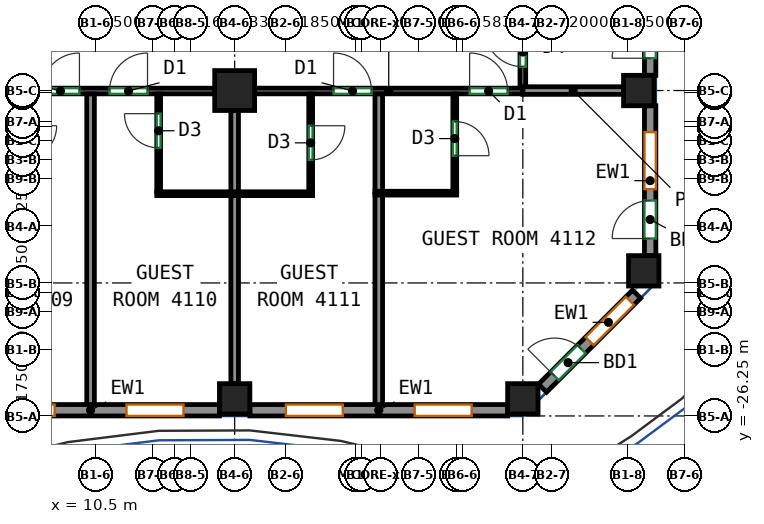
"""IFC4 building model, lengths in metres.
Left out: names, types, materials, properties, quantities, classifications, styles, units other than length and angle.
Written with IfcOpenShell. Run it as: python <this file> out.ifc"""

import sys

from ifc_helpers import new_model, si_unit, direction, frame, frame_2d, origin, origin_2d, place, context, subcontext, project, spatial, rectangle, extrude, source, transform, mapped, element, fill, save


model = new_model("IFC4")
c1 = context("Model", 3, precision=1e-05, world=origin(), true_north=direction((0.0, 1.0)))
c2 = subcontext(c1, "Body", "Model", "MODEL_VIEW")
j1 = project(units=[si_unit("LENGTHUNIT", "METRE"), si_unit("PLANEANGLEUNIT", "RADIAN")], contexts=[c1])
p1 = place(None, origin())
s1 = spatial("IfcSite", under=j1, at=p1, CompositionType="ELEMENT")
p2 = place(p1, origin())
s2 = spatial("IfcBuilding", under=s1, at=p2, CompositionType="ELEMENT")
p3 = place(p2, frame((0.0, 0.0, 175.3)))
s3 = spatial("IfcBuildingStorey", under=s2, at=p3, CompositionType="ELEMENT", Elevation=175.3)
m1 = source(origin(), c2, "Body", "SweptSolid", [
    extrude(rectangle(XDim=0.8, YDim=0.8, at=origin_2d()), origin(), (0.0, 0.0, 1.0), 3.12),
])
p4 = place(p3, frame((14.167, -25.8, 0.0), z_axis=(0.0, 0.0, 1.0), x_axis=(1.0, 0.0, 0.0)))
e1 = element("IfcColumn", 1, at=p4, inside=s3, PredefinedType="COLUMN", context=c2, shape_type="MappedRepresentation", body=[
    mapped(m1, transform((0.0, 0.0, 0.0))),
])
m2 = source(origin(), c2, "Body", "SweptSolid", [
    extrude(rectangle(XDim=1.05, YDim=1.05, at=origin_2d()), origin(), (0.0, 0.0, 1.0), 3.12),
])
p5 = place(p3, frame((14.167, -17.688, 0.0), z_axis=(0.0, 0.0, 1.0), x_axis=(1.0, 0.0, 0.0)))
e2 = element("IfcColumn", 2, at=p5, inside=s3, PredefinedType="COLUMN", context=c2, shape_type="MappedRepresentation", body=[
    mapped(m2, transform((0.0, 0.0, 0.0))),
])
for number, where, z_axis, x_axis in (
    (3, (21.75, -25.8, 0.0), (0.0, 0.0, 1.0), (1.0, 0.0, 0.0)),
    (4, (24.8, -17.688, 0.0), (0.0, 0.0, 1.0), (1.0, 0.0, 0.0)),
    (5, (24.932, -22.432, 0.0), (0.0, 0.0, 1.0), (1.0, 0.0, 0.0)),
):
    element("IfcColumn", number, at=place(p3, frame(where, z_axis=z_axis, x_axis=x_axis)), inside=s3, PredefinedType="COLUMN", context=c2, shape_type="MappedRepresentation", body=[
        mapped(m1, transform((0.0, 0.0, 0.0))),
    ])
m3 = source(origin(), c2, "Body", "SweptSolid", [
    extrude(rectangle(XDim=6.783, YDim=0.3, at=frame_2d((3.392, 0.0))), origin(), (0.0, 0.0, 1.0), 3.12),
])
p6 = place(p3, frame((6.983, -26.1, 0.0), z_axis=(0.0, 0.0, 1.0), x_axis=(1.0, 0.0, 0.0)))
e6 = element("IfcWall", 6, at=p6, inside=s3, PredefinedType="SOLIDWALL", context=c2, shape_type="MappedRepresentation", body=[
    mapped(m3, transform((0.0, 0.0, 0.0))),
])
p7 = place(p6, frame((0.946, 0.0, 0.85)))
e7 = element("IfcOpeningElement", 7, at=p7, cuts=e6, PredefinedType="OPENING", context=c2, shape_type="SweptSolid", body=[
    extrude(rectangle(XDim=1.5, YDim=1.95, at=frame_2d((0.75, 0.975))), frame((0.0, 0.16, 0.0), z_axis=(0.0, -1.0, 0.0), x_axis=(1.0, 0.0, 0.0)), (0.0, 0.0, 1.0), 0.32),
])
p8 = place(p6, frame((4.338, 0.0, 0.85)))
e8 = element("IfcOpeningElement", 8, at=p8, cuts=e6, PredefinedType="OPENING", context=c2, shape_type="SweptSolid", body=[
    extrude(rectangle(XDim=1.5, YDim=1.95, at=frame_2d((0.75, 0.975))), frame((0.0, 0.16, 0.0), z_axis=(0.0, -1.0, 0.0), x_axis=(1.0, 0.0, 0.0)), (0.0, 0.0, 1.0), 0.32),
])
m4 = source(origin(), c2, "Body", "SweptSolid", [
    extrude(rectangle(XDim=6.783, YDim=0.3, at=frame_2d((3.392, 0.0))), origin(), (0.0, 0.0, 1.0), 3.12),
])
p9 = place(p3, frame((14.567, -26.1, 0.0), z_axis=(0.0, 0.0, 1.0), x_axis=(1.0, 0.0, 0.0)))
e9 = element("IfcWall", 9, at=p9, inside=s3, PredefinedType="SOLIDWALL", context=c2, shape_type="MappedRepresentation", body=[
    mapped(m4, transform((0.0, 0.0, 0.0))),
])
p10 = place(p9, frame((0.946, 0.0, 0.85)))
e10 = element("IfcOpeningElement", 10, at=p10, cuts=e9, PredefinedType="OPENING", context=c2, shape_type="SweptSolid", body=[
    extrude(rectangle(XDim=1.5, YDim=1.95, at=frame_2d((0.75, 0.975))), frame((0.0, 0.16, 0.0), z_axis=(0.0, -1.0, 0.0), x_axis=(1.0, 0.0, 0.0)), (0.0, 0.0, 1.0), 0.32),
])
p11 = place(p9, frame((4.337, 0.0, 0.85)))
e11 = element("IfcOpeningElement", 11, at=p11, cuts=e9, PredefinedType="OPENING", context=c2, shape_type="SweptSolid", body=[
    extrude(rectangle(XDim=1.5, YDim=1.95, at=frame_2d((0.75, 0.975))), frame((0.0, 0.16, 0.0), z_axis=(0.0, -1.0, 0.0), x_axis=(1.0, 0.0, 0.0)), (0.0, 0.0, 1.0), 0.32),
])
m5 = source(origin(), c2, "Body", "SweptSolid", [
    extrude(rectangle(XDim=3.5, YDim=0.3, at=frame_2d((1.75, 0.0))), origin(), (0.0, 0.0, 1.0), 3.12),
])
p12 = place(p3, frame((22.269, -25.519, 0.0), z_axis=(0.0, 0.0, 1.0), x_axis=(0.707141656123, 0.70707190453, 0.0)))
e12 = element("IfcWall", 12, at=p12, inside=s3, PredefinedType="SOLIDWALL", context=c2, shape_type="MappedRepresentation", body=[
    mapped(m5, transform((0.0, 0.0, 0.0))),
])
p13 = place(p12, frame((1.75, 0.0, 0.85)))
e13 = element("IfcOpeningElement", 13, at=p13, cuts=e12, PredefinedType="OPENING", context=c2, shape_type="SweptSolid", body=[
    extrude(rectangle(XDim=1.5, YDim=1.95, at=frame_2d((0.75, 0.975))), frame((0.0, 0.16, 0.0), z_axis=(0.0, -1.0, 0.0), x_axis=(1.0, 0.0, 0.0)), (0.0, 0.0, 1.0), 0.32),
])
p14 = place(p12, frame((0.45, 0.0, 0.0)))
e14 = element("IfcOpeningElement", 14, at=p14, cuts=e12, PredefinedType="OPENING", context=c2, shape_type="SweptSolid", body=[
    extrude(rectangle(XDim=1.0, YDim=2.1, at=frame_2d((0.5, 1.05))), frame((0.0, 0.16, 0.0), z_axis=(0.0, -1.0, 0.0), x_axis=(1.0, 0.0, 0.0)), (0.0, 0.0, 1.0), 0.32),
])
m6 = source(origin(), c2, "Body", "SweptSolid", [
    extrude(rectangle(XDim=3.944, YDim=0.3, at=frame_2d((1.972, 0.0))), origin(), (0.0, 0.0, 1.0), 3.12),
])
p15 = place(p3, frame((25.1, -22.032, 0.0), z_axis=(0.0, 0.0, 1.0), x_axis=(0.0, 1.0, 0.0)))
e15 = element("IfcWall", 15, at=p15, inside=s3, PredefinedType="SOLIDWALL", context=c2, shape_type="MappedRepresentation", body=[
    mapped(m6, transform((0.0, 0.0, 0.0))),
])
p16 = place(p15, frame((1.75, 0.0, 0.85)))
e16 = element("IfcOpeningElement", 16, at=p16, cuts=e15, PredefinedType="OPENING", context=c2, shape_type="SweptSolid", body=[
    extrude(rectangle(XDim=1.5, YDim=1.95, at=frame_2d((0.75, 0.975))), frame((0.0, 0.16, 0.0), z_axis=(0.0, -1.0, 0.0), x_axis=(1.0, 0.0, 0.0)), (0.0, 0.0, 1.0), 0.32),
])
p17 = place(p15, frame((0.45, 0.0, 0.0)))
e17 = element("IfcOpeningElement", 17, at=p17, cuts=e15, PredefinedType="OPENING", context=c2, shape_type="SweptSolid", body=[
    extrude(rectangle(XDim=1.0, YDim=2.1, at=frame_2d((0.5, 1.05))), frame((0.0, 0.16, 0.0), z_axis=(0.0, -1.0, 0.0), x_axis=(1.0, 0.0, 0.0)), (0.0, 0.0, 1.0), 0.32),
])
m7 = source(origin(), c2, "Body", "SweptSolid", [
    extrude(rectangle(XDim=7.763, YDim=0.3, at=frame_2d((3.881, 0.0))), origin(), (0.0, 0.0, 1.0), 3.12),
])
p18 = place(p3, frame((25.1, -17.288, 0.0), z_axis=(0.0, 0.0, 1.0), x_axis=(0.0, 1.0, 0.0)))
e18 = element("IfcWall", 18, at=p18, inside=s3, PredefinedType="SOLIDWALL", context=c2, shape_type="MappedRepresentation", body=[
    mapped(m7, transform((0.0, 0.0, 0.0))),
])
p19 = place(p18, frame((1.75, 0.0, 0.85)))
e19 = element("IfcOpeningElement", 19, at=p19, cuts=e18, PredefinedType="OPENING", context=c2, shape_type="SweptSolid", body=[
    extrude(rectangle(XDim=1.5, YDim=1.95, at=frame_2d((0.75, 0.975))), frame((0.0, 0.16, 0.0), z_axis=(0.0, -1.0, 0.0), x_axis=(1.0, 0.0, 0.0)), (0.0, 0.0, 1.0), 0.32),
])
p20 = place(p18, frame((0.45, 0.0, 0.0)))
e20 = element("IfcOpeningElement", 20, at=p20, cuts=e18, PredefinedType="OPENING", context=c2, shape_type="SweptSolid", body=[
    extrude(rectangle(XDim=1.0, YDim=2.1, at=frame_2d((0.5, 1.05))), frame((0.0, 0.16, 0.0), z_axis=(0.0, -1.0, 0.0), x_axis=(1.0, 0.0, 0.0)), (0.0, 0.0, 1.0), 0.32),
])
p21 = place(p18, frame((5.631, 0.0, 0.85)))
e21 = element("IfcOpeningElement", 21, at=p21, cuts=e18, PredefinedType="OPENING", context=c2, shape_type="SweptSolid", body=[
    extrude(rectangle(XDim=1.5, YDim=1.95, at=frame_2d((0.75, 0.975))), frame((0.0, 0.16, 0.0), z_axis=(0.0, -1.0, 0.0), x_axis=(1.0, 0.0, 0.0)), (0.0, 0.0, 1.0), 0.32),
])
p22 = place(p3, frame((7.108, -17.7, 0.0), z_axis=(0.0, 0.0, 1.0), x_axis=(1.0, 0.0, 0.0)))
e22 = element("IfcWall", 22, at=p22, inside=s3, PredefinedType="PARTITIONING", context=c2, shape_type="SweptSolid", body=[
    extrude(rectangle(XDim=6.534, YDim=0.15, at=frame_2d((3.267, 0.0))), origin(), (0.0, 0.0, 1.0), 3.12),
])
p23 = place(p22, frame((1.974, 0.0, 0.0)))
e23 = element("IfcOpeningElement", 23, at=p23, cuts=e22, PredefinedType="OPENING", context=c2, shape_type="SweptSolid", body=[
    extrude(rectangle(XDim=1.0, YDim=2.1, at=frame_2d((0.5, 1.05))), frame((0.0, 0.085, 0.0), z_axis=(0.0, -1.0, 0.0), x_axis=(1.0, 0.0, 0.0)), (0.0, 0.0, 1.0), 0.17),
])
p24 = place(p22, frame((3.766, 0.0, 0.0)))
e24 = element("IfcOpeningElement", 24, at=p24, cuts=e22, PredefinedType="OPENING", context=c2, shape_type="SweptSolid", body=[
    extrude(rectangle(XDim=1.0, YDim=2.1, at=frame_2d((0.5, 1.05))), frame((0.0, 0.085, 0.0), z_axis=(0.0, -1.0, 0.0), x_axis=(1.0, 0.0, 0.0)), (0.0, 0.0, 1.0), 0.17),
])
p25 = place(p3, frame((14.692, -17.7, 0.0), z_axis=(0.0, 0.0, 1.0), x_axis=(1.0, 0.0, 0.0)))
e25 = element("IfcWall", 25, at=p25, inside=s3, PredefinedType="PARTITIONING", context=c2, shape_type="SweptSolid", body=[
    extrude(rectangle(XDim=7.058, YDim=0.15, at=frame_2d((3.529, 0.0))), origin(), (0.0, 0.0, 1.0), 2.52),
])
p26 = place(p25, frame((2.077, 0.0, 0.0)))
e26 = element("IfcOpeningElement", 26, at=p26, cuts=e25, PredefinedType="OPENING", context=c2, shape_type="SweptSolid", body=[
    extrude(rectangle(XDim=1.0, YDim=2.1, at=frame_2d((0.5, 1.05))), frame((0.0, 0.085, 0.0), z_axis=(0.0, -1.0, 0.0), x_axis=(1.0, 0.0, 0.0)), (0.0, 0.0, 1.0), 0.17),
])
p27 = place(p25, frame((5.657, 0.0, 0.0)))
e27 = element("IfcOpeningElement", 27, at=p27, cuts=e25, PredefinedType="OPENING", context=c2, shape_type="SweptSolid", body=[
    extrude(rectangle(XDim=1.0, YDim=2.1, at=frame_2d((0.5, 1.05))), frame((0.0, 0.085, 0.0), z_axis=(0.0, -1.0, 0.0), x_axis=(1.0, 0.0, 0.0)), (0.0, 0.0, 1.0), 0.17),
])
p28 = place(p3, frame((21.75, -17.598, 0.0), z_axis=(0.0, 0.0, 1.0), x_axis=(0.0, 1.0, 0.0)))
e28 = element("IfcWall", 28, at=p28, inside=s3, PredefinedType="PARTITIONING", context=c2, shape_type="SweptSolid", body=[
    extrude(rectangle(XDim=1.848, YDim=0.15, at=frame_2d((0.924, 0.0))), origin(), (0.0, 0.0, 1.0), 3.12),
])
p29 = place(p28, frame((0.536, 0.0, 0.0)))
e29 = element("IfcOpeningElement", 29, at=p29, cuts=e28, PredefinedType="OPENING", context=c2, shape_type="SweptSolid", body=[
    extrude(rectangle(XDim=1.0, YDim=2.1, at=frame_2d((0.5, 1.05))), frame((0.0, 0.085, 0.0), z_axis=(0.0, -1.0, 0.0), x_axis=(1.0, 0.0, 0.0)), (0.0, 0.0, 1.0), 0.17),
])
p30 = place(p3, frame((10.375, -26.0, 0.0), z_axis=(0.0, 0.0, 1.0), x_axis=(0.0, 1.0, 0.0)))
e30 = element("IfcWall", 30, at=p30, inside=s3, PredefinedType="PARTITIONING", context=c2, shape_type="SweptSolid", body=[
    extrude(rectangle(XDim=8.223, YDim=0.2, at=frame_2d((4.111, 0.0))), origin(), (0.0, 0.0, 1.0), 3.12),
])
p31 = place(p3, frame((12.167, -20.352, 0.0), z_axis=(0.0, 0.0, 1.0), x_axis=(0.0, 1.0, 0.0)))
e31 = element("IfcWall", 31, at=p31, inside=s3, PredefinedType="PARTITIONING", context=c2, shape_type="SweptSolid", body=[
    extrude(rectangle(XDim=2.575, YDim=0.1, at=frame_2d((1.288, 0.0))), origin(), (0.0, 0.0, 1.0), 3.12),
])
p32 = place(p31, frame((1.156, 0.0, 0.0)))
e32 = element("IfcOpeningElement", 32, at=p32, cuts=e31, PredefinedType="OPENING", context=c2, shape_type="SweptSolid", body=[
    extrude(rectangle(XDim=0.9, YDim=2.1, at=frame_2d((0.45, 1.05))), frame((0.0, 0.06, 0.0), z_axis=(0.0, -1.0, 0.0), x_axis=(1.0, 0.0, 0.0)), (0.0, 0.0, 1.0), 0.12),
])
p33 = place(p3, frame((12.117, -20.402, 0.0), z_axis=(0.0, 0.0, 1.0), x_axis=(1.0, 0.0, 0.0)))
e33 = element("IfcWall", 33, at=p33, inside=s3, PredefinedType="PARTITIONING", context=c2, shape_type="SweptSolid", body=[
    extrude(rectangle(XDim=4.1, YDim=0.1, at=frame_2d((2.05, 0.0))), origin(), (0.0, 0.0, 1.0), 3.12),
])
p34 = place(p3, frame((14.167, -25.4, 0.0), z_axis=(0.0, 0.0, 1.0), x_axis=(0.0, 1.0, 0.0)))
e34 = element("IfcWall", 34, at=p34, inside=s3, PredefinedType="PARTITIONING", context=c2, shape_type="SweptSolid", body=[
    extrude(rectangle(XDim=4.948, YDim=0.2, at=frame_2d((2.474, 0.0))), origin(), (0.0, 0.0, 1.0), 3.12),
])
p35 = place(p3, frame((14.167, -20.352, 0.0), z_axis=(0.0, 0.0, 1.0), x_axis=(0.0, 1.0, 0.0)))
e35 = element("IfcWall", 35, at=p35, inside=s3, PredefinedType="PARTITIONING", context=c2, shape_type="SweptSolid", body=[
    extrude(rectangle(XDim=2.14, YDim=0.2, at=frame_2d((1.07, 0.0))), origin(), (0.0, 0.0, 1.0), 3.12),
])
p36 = place(p3, frame((16.167, -17.777, 0.0), z_axis=(0.0, 0.0, 1.0), x_axis=(0.0, -1.0, 0.0)))
e36 = element("IfcWall", 36, at=p36, inside=s3, PredefinedType="PARTITIONING", context=c2, shape_type="SweptSolid", body=[
    extrude(rectangle(XDim=2.575, YDim=0.1, at=frame_2d((1.288, 0.0))), origin(), (0.0, 0.0, 1.0), 3.12),
])
p37 = place(p36, frame((0.837, 0.0, 0.0)))
e37 = element("IfcOpeningElement", 37, at=p37, cuts=e36, PredefinedType="OPENING", context=c2, shape_type="SweptSolid", body=[
    extrude(rectangle(XDim=0.9, YDim=2.1, at=frame_2d((0.45, 1.05))), frame((0.0, 0.06, 0.0), z_axis=(0.0, -1.0, 0.0), x_axis=(1.0, 0.0, 0.0)), (0.0, 0.0, 1.0), 0.12),
])
p38 = place(p3, frame((17.959, -26.0, 0.0), z_axis=(0.0, 0.0, 1.0), x_axis=(0.0, 1.0, 0.0)))
e38 = element("IfcWall", 38, at=p38, inside=s3, PredefinedType="PARTITIONING", context=c2, shape_type="SweptSolid", body=[
    extrude(rectangle(XDim=5.572, YDim=0.2, at=frame_2d((2.786, 0.0))), origin(), (0.0, 0.0, 1.0), 3.12),
])
p39 = place(p3, frame((17.959, -20.348, 0.0), z_axis=(0.0, 0.0, 1.0), x_axis=(0.0, 1.0, 0.0)))
e39 = element("IfcWall", 39, at=p39, inside=s3, PredefinedType="PARTITIONING", context=c2, shape_type="SweptSolid", body=[
    extrude(rectangle(XDim=2.571, YDim=0.2, at=frame_2d((1.285, 0.0))), origin(), (0.0, 0.0, 1.0), 3.12),
])
p40 = place(p3, frame((17.859, -20.388, 0.0), z_axis=(0.0, 0.0, 1.0), x_axis=(1.0, 0.0, 0.0)))
e40 = element("IfcWall", 40, at=p40, inside=s3, PredefinedType="PARTITIONING", context=c2, shape_type="SweptSolid", body=[
    extrude(rectangle(XDim=2.15, YDim=0.1, at=frame_2d((1.075, 0.0))), origin(), (0.0, 0.0, 1.0), 3.12),
])
p41 = place(p3, frame((19.959, -17.777, 0.0), z_axis=(0.0, 0.0, 1.0), x_axis=(0.0, -1.0, 0.0)))
e41 = element("IfcWall", 41, at=p41, inside=s3, PredefinedType="PARTITIONING", context=c2, shape_type="SweptSolid", body=[
    extrude(rectangle(XDim=2.561, YDim=0.1, at=frame_2d((1.28, 0.0))), origin(), (0.0, 0.0, 1.0), 3.12),
])
p42 = place(p41, frame((0.725, 0.0, 0.0)))
e42 = element("IfcOpeningElement", 42, at=p42, cuts=e41, PredefinedType="OPENING", context=c2, shape_type="SweptSolid", body=[
    extrude(rectangle(XDim=0.9, YDim=2.1, at=frame_2d((0.45, 1.05))), frame((0.0, 0.06, 0.0), z_axis=(0.0, -1.0, 0.0), x_axis=(1.0, 0.0, 0.0)), (0.0, 0.0, 1.0), 0.12),
])
p43 = place(p3, frame((21.752, -17.688, 0.0), z_axis=(0.0, 0.0, 1.0), x_axis=(1.0, 0.0, 0.0)))
e43 = element("IfcWall", 43, at=p43, inside=s3, PredefinedType="PARTITIONING", context=c2, shape_type="SweptSolid", body=[
    extrude(rectangle(XDim=2.648, YDim=0.2, at=frame_2d((1.324, 0.0))), origin(), (0.0, 0.0, 1.0), 2.52),
])
p44 = place(p7, origin())
e44 = element("IfcWindow", 44, at=p44, inside=s3, PartitioningType="SINGLE_PANEL", PredefinedType="WINDOW", context=c2, shape_type="SweptSolid", body=[
    extrude(rectangle(XDim=1.5, YDim=1.95, at=frame_2d((0.75, 0.975))), frame((0.0, 0.03, 0.0), z_axis=(0.0, -1.0, 0.0), x_axis=(1.0, 0.0, 0.0)), (0.0, 0.0, 1.0), 0.06),
])
fill(e7, e44)
p45 = place(p8, origin())
e45 = element("IfcWindow", 45, at=p45, inside=s3, PartitioningType="SINGLE_PANEL", PredefinedType="WINDOW", context=c2, shape_type="SweptSolid", body=[
    extrude(rectangle(XDim=1.5, YDim=1.95, at=frame_2d((0.75, 0.975))), frame((0.0, 0.03, 0.0), z_axis=(0.0, -1.0, 0.0), x_axis=(1.0, 0.0, 0.0)), (0.0, 0.0, 1.0), 0.06),
])
fill(e8, e45)
p46 = place(p10, origin())
e46 = element("IfcWindow", 46, at=p46, inside=s3, PartitioningType="SINGLE_PANEL", PredefinedType="WINDOW", context=c2, shape_type="SweptSolid", body=[
    extrude(rectangle(XDim=1.5, YDim=1.95, at=frame_2d((0.75, 0.975))), frame((0.0, 0.03, 0.0), z_axis=(0.0, -1.0, 0.0), x_axis=(1.0, 0.0, 0.0)), (0.0, 0.0, 1.0), 0.06),
])
fill(e10, e46)
p47 = place(p11, origin())
e47 = element("IfcWindow", 47, at=p47, inside=s3, PartitioningType="SINGLE_PANEL", PredefinedType="WINDOW", context=c2, shape_type="SweptSolid", body=[
    extrude(rectangle(XDim=1.5, YDim=1.95, at=frame_2d((0.75, 0.975))), frame((0.0, 0.03, 0.0), z_axis=(0.0, -1.0, 0.0), x_axis=(1.0, 0.0, 0.0)), (0.0, 0.0, 1.0), 0.06),
])
fill(e11, e47)
p48 = place(p13, origin())
e48 = element("IfcWindow", 48, at=p48, inside=s3, PartitioningType="SINGLE_PANEL", PredefinedType="WINDOW", context=c2, shape_type="SweptSolid", body=[
    extrude(rectangle(XDim=1.5, YDim=1.95, at=frame_2d((0.75, 0.975))), frame((0.0, 0.03, 0.0), z_axis=(0.0, -1.0, 0.0), x_axis=(1.0, 0.0, 0.0)), (0.0, 0.0, 1.0), 0.06),
])
fill(e13, e48)
p49 = place(p14, origin())
e49 = element("IfcDoor", 49, at=p49, inside=s3, OperationType="SINGLE_SWING_LEFT", PredefinedType="DOOR", context=c2, shape_type="SweptSolid", body=[
    extrude(rectangle(XDim=1.0, YDim=2.1, at=frame_2d((0.5, 1.05))), frame((0.0, 0.025, 0.0), z_axis=(0.0, -1.0, 0.0), x_axis=(1.0, 0.0, 0.0)), (0.0, 0.0, 1.0), 0.05),
])
fill(e14, e49)
p50 = place(p16, origin())
e50 = element("IfcWindow", 50, at=p50, inside=s3, PartitioningType="SINGLE_PANEL", PredefinedType="WINDOW", context=c2, shape_type="SweptSolid", body=[
    extrude(rectangle(XDim=1.5, YDim=1.95, at=frame_2d((0.75, 0.975))), frame((0.0, 0.03, 0.0), z_axis=(0.0, -1.0, 0.0), x_axis=(1.0, 0.0, 0.0)), (0.0, 0.0, 1.0), 0.06),
])
fill(e16, e50)
p51 = place(p17, origin())
e51 = element("IfcDoor", 51, at=p51, inside=s3, OperationType="SINGLE_SWING_LEFT", PredefinedType="DOOR", context=c2, shape_type="SweptSolid", body=[
    extrude(rectangle(XDim=1.0, YDim=2.1, at=frame_2d((0.5, 1.05))), frame((0.0, 0.025, 0.0), z_axis=(0.0, -1.0, 0.0), x_axis=(1.0, 0.0, 0.0)), (0.0, 0.0, 1.0), 0.05),
])
fill(e17, e51)
p52 = place(p20, origin())
e52 = element("IfcDoor", 52, at=p52, inside=s3, OperationType="SINGLE_SWING_LEFT", PredefinedType="DOOR", context=c2, shape_type="SweptSolid", body=[
    extrude(rectangle(XDim=1.0, YDim=2.1, at=frame_2d((0.5, 1.05))), frame((0.0, 0.025, 0.0), z_axis=(0.0, -1.0, 0.0), x_axis=(1.0, 0.0, 0.0)), (0.0, 0.0, 1.0), 0.05),
])
fill(e20, e52)
p53 = place(p37, origin())
e53 = element("IfcDoor", 53, at=p53, inside=s3, OperationType="SINGLE_SWING_LEFT", PredefinedType="DOOR", context=c2, shape_type="SweptSolid", body=[
    extrude(rectangle(XDim=0.9, YDim=2.1, at=frame_2d((0.45, 1.05))), frame((0.0, 0.025, 0.0), z_axis=(0.0, -1.0, 0.0), x_axis=(1.0, 0.0, 0.0)), (0.0, 0.0, 1.0), 0.05),
])
fill(e37, e53)
p54 = place(p42, origin())
e54 = element("IfcDoor", 54, at=p54, inside=s3, OperationType="SINGLE_SWING_RIGHT", PredefinedType="DOOR", context=c2, shape_type="SweptSolid", body=[
    extrude(rectangle(XDim=0.9, YDim=2.1, at=frame_2d((0.45, 1.05))), frame((0.0, 0.025, 0.0), z_axis=(0.0, -1.0, 0.0), x_axis=(1.0, 0.0, 0.0)), (0.0, 0.0, 1.0), 0.05),
])
fill(e42, e54)
p55 = place(p32, origin())
e55 = element("IfcDoor", 55, at=p55, inside=s3, OperationType="SINGLE_SWING_RIGHT", PredefinedType="DOOR", context=c2, shape_type="SweptSolid", body=[
    extrude(rectangle(XDim=0.9, YDim=2.1, at=frame_2d((0.45, 1.05))), frame((0.0, 0.025, 0.0), z_axis=(0.0, -1.0, 0.0), x_axis=(1.0, 0.0, 0.0)), (0.0, 0.0, 1.0), 0.05),
])
fill(e32, e55)
p56 = place(p23, origin())
e56 = element("IfcDoor", 56, at=p56, inside=s3, OperationType="SINGLE_SWING_RIGHT", PredefinedType="DOOR", context=c2, shape_type="SweptSolid", body=[
    extrude(rectangle(XDim=1.0, YDim=2.1, at=frame_2d((0.5, 1.05))), frame((0.0, 0.025, 0.0), z_axis=(0.0, -1.0, 0.0), x_axis=(1.0, 0.0, 0.0)), (0.0, 0.0, 1.0), 0.05),
])
fill(e23, e56)
p57 = place(p24, origin())
e57 = element("IfcDoor", 57, at=p57, inside=s3, OperationType="SINGLE_SWING_RIGHT", PredefinedType="DOOR", context=c2, shape_type="SweptSolid", body=[
    extrude(rectangle(XDim=1.0, YDim=2.1, at=frame_2d((0.5, 1.05))), frame((0.0, 0.025, 0.0), z_axis=(0.0, -1.0, 0.0), x_axis=(1.0, 0.0, 0.0)), (0.0, 0.0, 1.0), 0.05),
])
fill(e24, e57)
p58 = place(p26, origin())
e58 = element("IfcDoor", 58, at=p58, inside=s3, OperationType="SINGLE_SWING_LEFT", PredefinedType="DOOR", context=c2, shape_type="SweptSolid", body=[
    extrude(rectangle(XDim=1.0, YDim=2.1, at=frame_2d((0.5, 1.05))), frame((0.0, 0.025, 0.0), z_axis=(0.0, -1.0, 0.0), x_axis=(1.0, 0.0, 0.0)), (0.0, 0.0, 1.0), 0.05),
])
fill(e26, e58)
p59 = place(p27, origin())
e59 = element("IfcDoor", 59, at=p59, inside=s3, OperationType="SINGLE_SWING_LEFT", PredefinedType="DOOR", context=c2, shape_type="SweptSolid", body=[
    extrude(rectangle(XDim=1.0, YDim=2.1, at=frame_2d((0.5, 1.05))), frame((0.0, 0.025, 0.0), z_axis=(0.0, -1.0, 0.0), x_axis=(1.0, 0.0, 0.0)), (0.0, 0.0, 1.0), 0.05),
])
fill(e27, e59)
p60 = place(p29, origin())
e60 = element("IfcDoor", 60, at=p60, inside=s3, OperationType="SINGLE_SWING_RIGHT", PredefinedType="DOOR", context=c2, shape_type="SweptSolid", body=[
    extrude(rectangle(XDim=1.0, YDim=2.1, at=frame_2d((0.5, 1.05))), frame((0.0, 0.025, 0.0), z_axis=(0.0, -1.0, 0.0), x_axis=(1.0, 0.0, 0.0)), (0.0, 0.0, 1.0), 0.05),
])
fill(e29, e60)
save(model, sys.argv[1])
